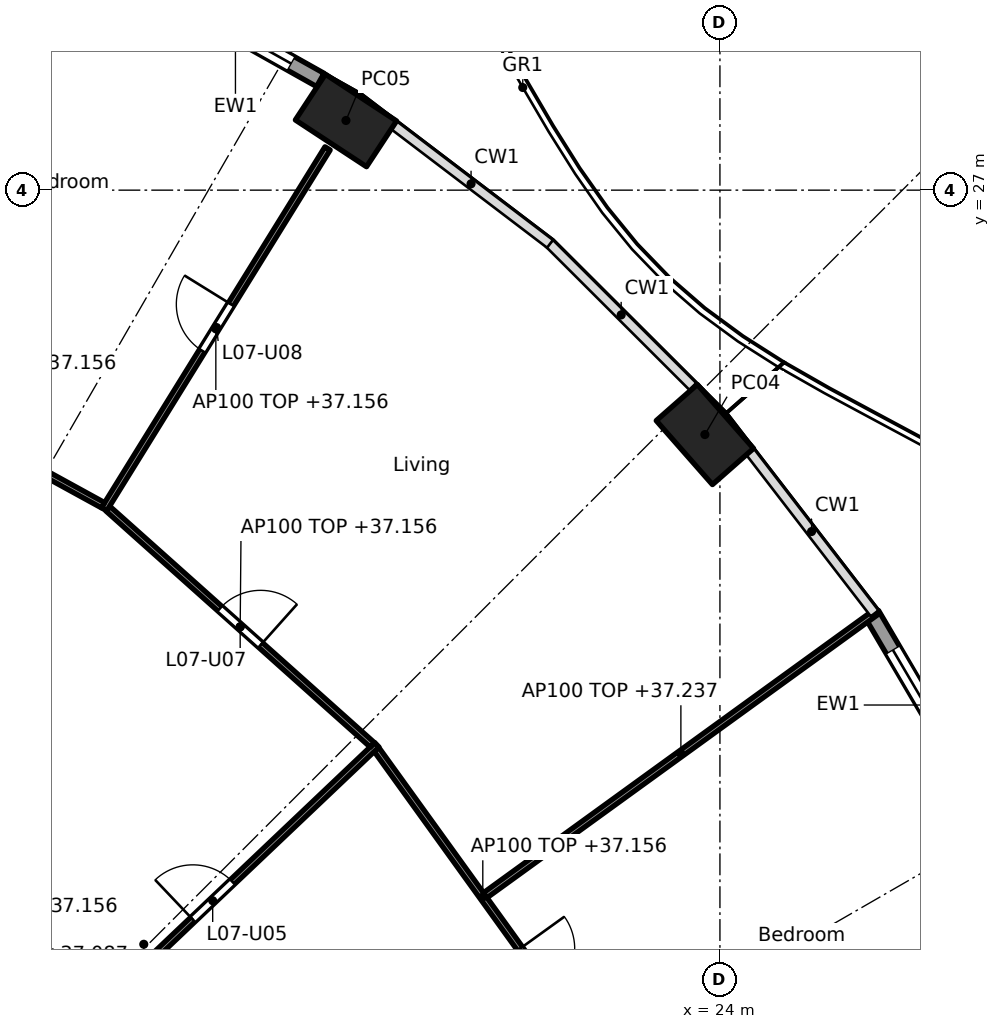
"""IFC4 building model, lengths in metres.
Left out: names, types, materials, properties, quantities, classifications, styles, units other than length and angle.
Written with IfcOpenShell. Run it as: python <this file> out.ifc"""

import sys

from ifc_helpers import new_model, si_unit, direction, frame, frame_2d, origin, origin_2d, place, context, subcontext, project, spatial, rectangle, hollow_rectangle, extrude, element, fill, save


model = new_model("IFC4")
c1 = context("Model", 3, precision=1e-05, world=origin(), true_north=direction((0.0, 1.0)))
c2 = subcontext(c1, "Body", "Model", "MODEL_VIEW")
j1 = project(units=[si_unit("LENGTHUNIT", "METRE"), si_unit("PLANEANGLEUNIT", "RADIAN")], contexts=[c1])
p1 = place(None, origin())
s1 = spatial("IfcSite", under=j1, at=p1, CompositionType="ELEMENT")
p2 = place(p1, origin())
s2 = spatial("IfcBuilding", under=s1, at=p2, CompositionType="ELEMENT")
p3 = place(p2, frame((0.0, 0.0, 34.4)))
s3 = spatial("IfcBuildingStorey", under=s2, at=p3, CompositionType="ELEMENT", Elevation=34.4)
for number, where, z_axis, x_axis in (
    (1, (23.752, 22.981, 0.0), (0.0, 0.0, 1.0), (-0.66, 0.751, 0.0)),
    (2, (17.85, 28.146, 0.0), (0.0, 0.0, 1.0), (-0.836, 0.549, 0.0)),
):
    element("IfcColumn", number, at=place(p3, frame(where, z_axis=z_axis, x_axis=x_axis)), inside=s3, PredefinedType="COLUMN", context=c2, shape_type="SweptSolid", body=[
        extrude(hollow_rectangle(XDim=1.4, YDim=0.9, WallThickness=0.05, at=origin_2d()), origin(), (0.0, 0.0, 1.0), 3.7),
    ])
p4 = place(p3, frame((26.5, 20.026, 0.0), z_axis=(0.0, 0.0, 1.0), x_axis=(0.506311160839, -0.862350861546, 0.0)))
e3 = element("IfcWall", 3, at=p4, inside=s3, PredefinedType="SOLIDWALL", context=c2, shape_type="SweptSolid", body=[
    extrude(rectangle(XDim=3.462, YDim=0.25, at=frame_2d((1.731, 0.0))), origin(), (0.0, 0.0, 1.0), 3.44),
])
p5 = place(p4, frame((0.681, 0.0, 0.0)))
e4 = element("IfcOpeningElement", 4, at=p5, cuts=e3, PredefinedType="OPENING", context=c2, shape_type="SweptSolid", body=[
    extrude(rectangle(XDim=2.1, YDim=2.4, at=frame_2d((1.05, 1.2))), frame((0.0, 0.135, 0.0), z_axis=(0.0, -1.0, 0.0), x_axis=(1.0, 0.0, 0.0)), (0.0, 0.0, 1.0), 0.27),
])
p6 = place(p3, frame((14.637, 30.379, 0.0), z_axis=(0.0, 0.0, 1.0), x_axis=(0.872102558443, -0.489323132048, 0.0)))
e5 = element("IfcWall", 5, at=p6, inside=s3, PredefinedType="SOLIDWALL", context=c2, shape_type="SweptSolid", body=[
    extrude(rectangle(XDim=3.201, YDim=0.25, at=frame_2d((1.601, 0.0))), origin(), (0.0, 0.0, 1.0), 3.44),
])
p7 = place(p6, frame((0.551, 0.0, 0.0)))
e6 = element("IfcOpeningElement", 6, at=p7, cuts=e5, PredefinedType="OPENING", context=c2, shape_type="SweptSolid", body=[
    extrude(rectangle(XDim=2.1, YDim=2.4, at=frame_2d((1.05, 1.2))), frame((0.0, 0.135, 0.0), z_axis=(0.0, -1.0, 0.0), x_axis=(1.0, 0.0, 0.0)), (0.0, 0.0, 1.0), 0.27),
])
p8 = place(p3, frame((21.849, 12.948, 0.0), z_axis=(0.0, 0.0, 1.0), x_axis=(-0.584563700282, 0.811347817099, 0.0)))
e7 = element("IfcWall", 7, at=p8, inside=s3, PredefinedType="PARTITIONING", context=c2, shape_type="SweptSolid", body=[
    extrude(rectangle(XDim=5.984, YDim=0.1, at=frame_2d((2.992, 0.0))), origin(), (0.0, 0.0, 1.0), 2.756),
])
p9 = place(p8, frame((1.046, 0.0, 0.0)))
e8 = element("IfcOpeningElement", 8, at=p9, cuts=e7, PredefinedType="OPENING", context=c2, shape_type="SweptSolid", body=[
    extrude(rectangle(XDim=0.9, YDim=2.1, at=frame_2d((0.45, 1.05))), frame((0.0, 0.06, 0.0), z_axis=(0.0, -1.0, 0.0), x_axis=(1.0, 0.0, 0.0)), (0.0, 0.0, 1.0), 0.12),
])
p10 = place(p3, frame((20.141, 15.405, 0.0), z_axis=(0.0, 0.0, 1.0), x_axis=(0.809834895779, 0.58665785734, 0.0)))
e9 = element("IfcWall", 9, at=p10, inside=s3, PredefinedType="PARTITIONING", context=c2, shape_type="SweptSolid", body=[
    extrude(rectangle(XDim=7.945, YDim=0.1, at=frame_2d((3.973, 0.0))), origin(), (0.0, 0.0, 1.0), 2.837),
])
p11 = place(p3, frame((8.957, 8.953, 0.0), z_axis=(0.0, 0.0, 1.0), x_axis=(0.725250022034, 0.688485588476, 0.0)))
e10 = element("IfcWall", 10, at=p11, inside=s3, PredefinedType="PARTITIONING", context=c2, shape_type="SweptSolid", body=[
    extrude(rectangle(XDim=12.963, YDim=0.1, at=frame_2d((6.481, 0.0))), origin(), (0.0, 0.0, 1.0), 2.687),
])
p12 = place(p11, frame((2.333, 0.0, 0.0)))
e11 = element("IfcOpeningElement", 11, at=p12, cuts=e10, PredefinedType="OPENING", context=c2, shape_type="SweptSolid", body=[
    extrude(rectangle(XDim=0.9, YDim=2.1, at=frame_2d((0.45, 1.05))), frame((0.0, 0.06, 0.0), z_axis=(0.0, -1.0, 0.0), x_axis=(1.0, 0.0, 0.0)), (0.0, 0.0, 1.0), 0.12),
])
p13 = place(p11, frame((8.79, 0.0, 0.0)))
e12 = element("IfcOpeningElement", 12, at=p13, cuts=e10, PredefinedType="OPENING", context=c2, shape_type="SweptSolid", body=[
    extrude(rectangle(XDim=0.9, YDim=2.1, at=frame_2d((0.45, 1.05))), frame((0.0, 0.06, 0.0), z_axis=(0.0, -1.0, 0.0), x_axis=(1.0, 0.0, 0.0)), (0.0, 0.0, 1.0), 0.12),
])
p14 = place(p3, frame((18.285, 17.877, 0.0), z_axis=(0.0, 0.0, 1.0), x_axis=(-0.745806142791, 0.666163041136, 0.0)))
e13 = element("IfcWall", 13, at=p14, inside=s3, PredefinedType="PARTITIONING", context=c2, shape_type="SweptSolid", body=[
    extrude(rectangle(XDim=5.831, YDim=0.1, at=frame_2d((2.915, 0.0))), origin(), (0.0, 0.0, 1.0), 2.756),
])
p15 = place(p14, frame((2.465, 0.0, 0.0)))
e14 = element("IfcOpeningElement", 14, at=p15, cuts=e13, PredefinedType="OPENING", context=c2, shape_type="SweptSolid", body=[
    extrude(rectangle(XDim=0.9, YDim=2.1, at=frame_2d((0.45, 1.05))), frame((0.0, 0.06, 0.0), z_axis=(0.0, -1.0, 0.0), x_axis=(1.0, 0.0, 0.0)), (0.0, 0.0, 1.0), 0.12),
])
p16 = place(p3, frame((13.873, 21.752, 0.0), z_axis=(0.0, 0.0, 1.0), x_axis=(0.52644491616, 0.850209239099, 0.0)))
e15 = element("IfcWall", 15, at=p16, inside=s3, PredefinedType="PARTITIONING", context=c2, shape_type="SweptSolid", body=[
    extrude(rectangle(XDim=6.98, YDim=0.1, at=frame_2d((3.49, 0.0))), origin(), (0.0, 0.0, 1.0), 2.756),
])
p17 = place(p16, frame((3.065, 0.0, 0.0)))
e16 = element("IfcOpeningElement", 16, at=p17, cuts=e15, PredefinedType="OPENING", context=c2, shape_type="SweptSolid", body=[
    extrude(rectangle(XDim=0.9, YDim=2.1, at=frame_2d((0.45, 1.05))), frame((0.0, 0.06, 0.0), z_axis=(0.0, -1.0, 0.0), x_axis=(1.0, 0.0, 0.0)), (0.0, 0.0, 1.0), 0.12),
])
p18 = place(p3, frame((13.855, 21.818, 0.0), z_axis=(0.0, 0.0, 1.0), x_axis=(-0.876809987787, 0.480837025734, 0.0)))
e17 = element("IfcWall", 17, at=p18, inside=s3, PredefinedType="PARTITIONING", context=c2, shape_type="SweptSolid", body=[
    extrude(rectangle(XDim=5.486, YDim=0.1, at=frame_2d((2.743, 0.0))), origin(), (0.0, 0.0, 1.0), 2.756),
])
p19 = place(p5, origin())
e18 = element("IfcDoor", 18, at=p19, inside=s3, OperationType="SLIDING_TO_LEFT", PredefinedType="DOOR", context=c2, shape_type="SweptSolid", body=[
    extrude(rectangle(XDim=2.1, YDim=2.4, at=frame_2d((1.05, 1.2))), frame((0.0, 0.025, 0.0), z_axis=(0.0, -1.0, 0.0), x_axis=(1.0, 0.0, 0.0)), (0.0, 0.0, 1.0), 0.05),
])
fill(e4, e18)
p20 = place(p7, origin())
e19 = element("IfcDoor", 19, at=p20, inside=s3, OperationType="SLIDING_TO_LEFT", PredefinedType="DOOR", context=c2, shape_type="SweptSolid", body=[
    extrude(rectangle(XDim=2.1, YDim=2.4, at=frame_2d((1.05, 1.2))), frame((0.0, 0.025, 0.0), z_axis=(0.0, -1.0, 0.0), x_axis=(1.0, 0.0, 0.0)), (0.0, 0.0, 1.0), 0.05),
])
fill(e6, e19)
p21 = place(p13, origin())
e20 = element("IfcDoor", 20, at=p21, inside=s3, OperationType="SINGLE_SWING_LEFT", PredefinedType="DOOR", context=c2, shape_type="SweptSolid", body=[
    extrude(rectangle(XDim=0.9, YDim=2.1, at=frame_2d((0.45, 1.05))), frame((0.0, 0.025, 0.0), z_axis=(0.0, -1.0, 0.0), x_axis=(1.0, 0.0, 0.0)), (0.0, 0.0, 1.0), 0.05),
])
fill(e12, e20)
p22 = place(p9, frame((0.9, 0.0, 0.0), x_axis=(-1.0, 0.0, 0.0)))
e21 = element("IfcDoor", 21, at=p22, inside=s3, OperationType="SINGLE_SWING_LEFT", PredefinedType="DOOR", context=c2, shape_type="SweptSolid", body=[
    extrude(rectangle(XDim=0.9, YDim=2.1, at=frame_2d((0.45, 1.05))), frame((0.0, 0.025, 0.0), z_axis=(0.0, -1.0, 0.0), x_axis=(1.0, 0.0, 0.0)), (0.0, 0.0, 1.0), 0.05),
])
fill(e8, e21)
p23 = place(p15, frame((0.9, 0.0, 0.0), x_axis=(-1.0, 0.0, 0.0)))
e22 = element("IfcDoor", 22, at=p23, inside=s3, OperationType="SINGLE_SWING_RIGHT", PredefinedType="DOOR", context=c2, shape_type="SweptSolid", body=[
    extrude(rectangle(XDim=0.9, YDim=2.1, at=frame_2d((0.45, 1.05))), frame((0.0, 0.025, 0.0), z_axis=(0.0, -1.0, 0.0), x_axis=(1.0, 0.0, 0.0)), (0.0, 0.0, 1.0), 0.05),
])
fill(e14, e22)
p24 = place(p17, origin())
e23 = element("IfcDoor", 23, at=p24, inside=s3, OperationType="SINGLE_SWING_RIGHT", PredefinedType="DOOR", context=c2, shape_type="SweptSolid", body=[
    extrude(rectangle(XDim=0.9, YDim=2.1, at=frame_2d((0.45, 1.05))), frame((0.0, 0.025, 0.0), z_axis=(0.0, -1.0, 0.0), x_axis=(1.0, 0.0, 0.0)), (0.0, 0.0, 1.0), 0.05),
])
fill(e16, e23)
save(model, sys.argv[1])
